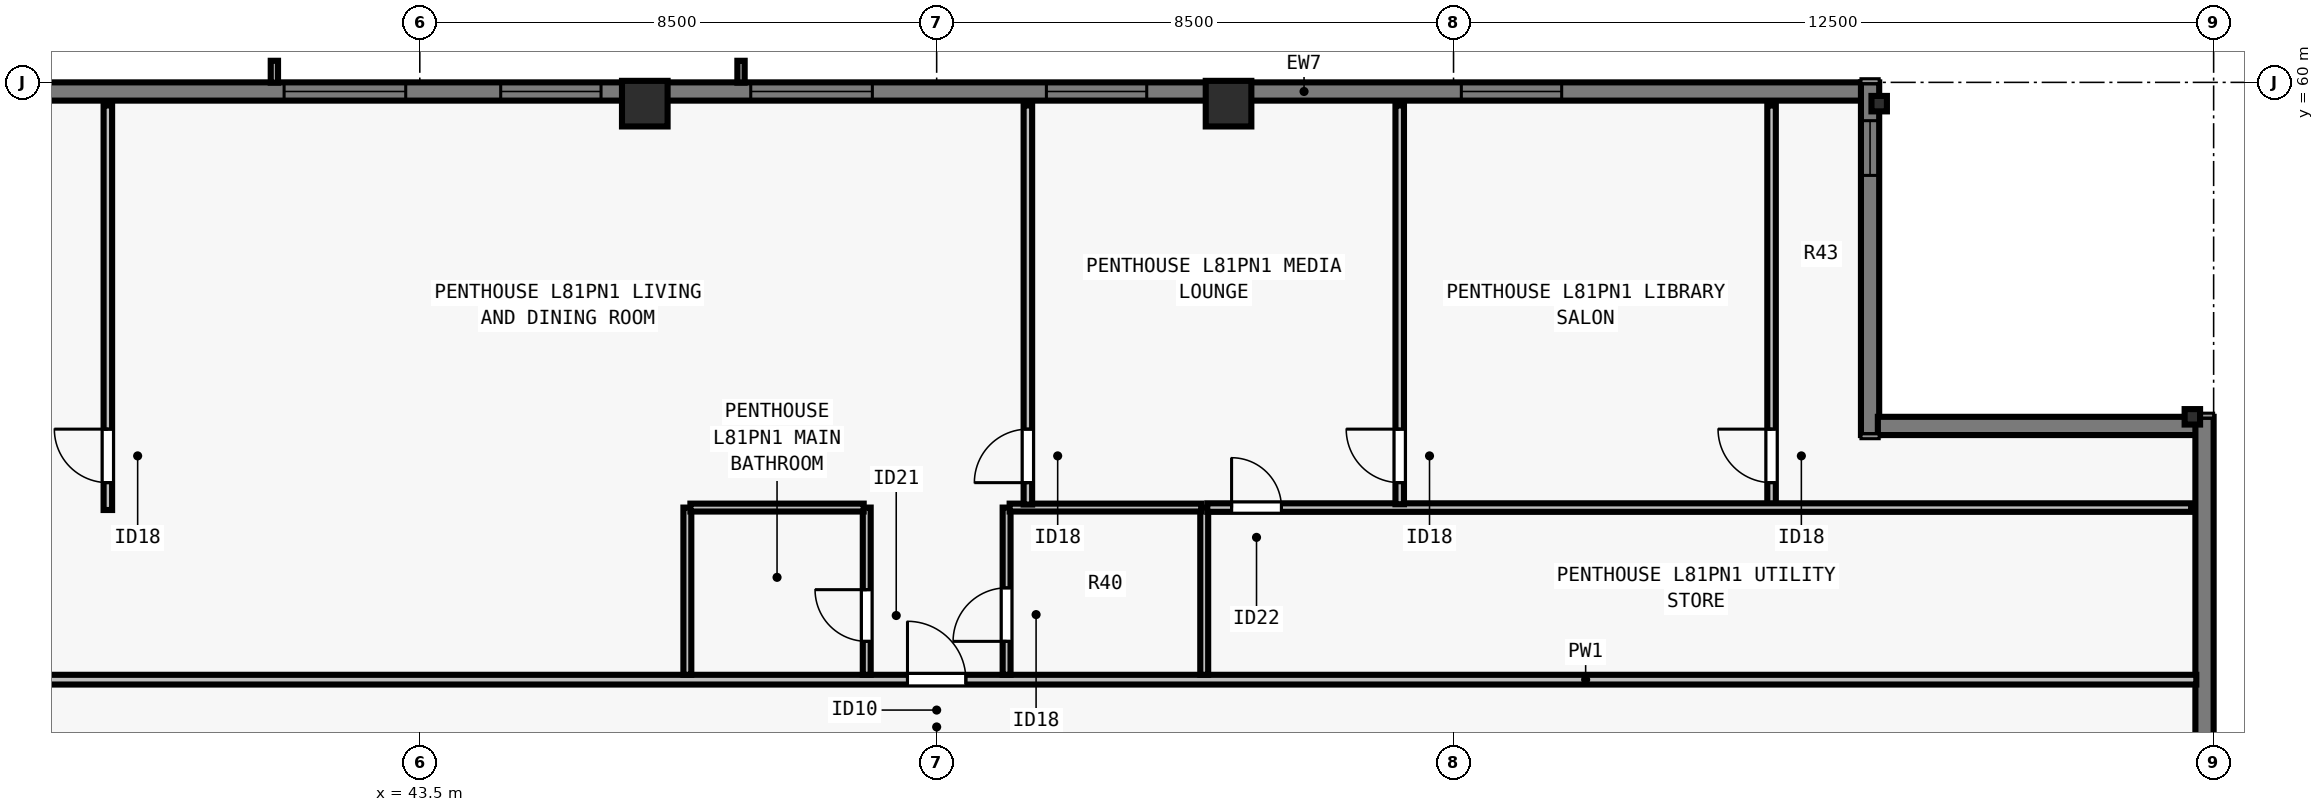
"""IFC4 building model, lengths in metres.
Left out: names, types, materials, properties, quantities, classifications, styles, units other than length and angle.
Written with IfcOpenShell. Run it as: python <this file> out.ifc"""

import sys

from ifc_helpers import new_model, si_unit, direction, frame, frame_2d, origin, origin_2d, place, context, subcontext, project, spatial, rectangle, i_section, extrude, element, fill, save


model = new_model("IFC4")
c1 = context("Model", 3, precision=1e-05, world=origin(), true_north=direction((0.0, 1.0)))
c2 = subcontext(c1, "Body", "Model", "MODEL_VIEW")
j1 = project(units=[si_unit("LENGTHUNIT", "METRE"), si_unit("PLANEANGLEUNIT", "RADIAN")], contexts=[c1])
p1 = place(None, origin())
s1 = spatial("IfcSite", under=j1, at=p1, CompositionType="ELEMENT")
p2 = place(p1, origin())
s2 = spatial("IfcBuilding", under=s1, at=p2, CompositionType="ELEMENT")
p3 = place(p2, frame((0.0, 0.0, 294.5)))
s3 = spatial("IfcBuildingStorey", under=s2, at=p3, CompositionType="ELEMENT", Elevation=294.5)
for number, where, z_axis, x_axis in (
    (1, (72.65, 54.5, 0.0), (0.0, 0.0, 1.0), (0.0, 1.0, 0.0)),
    (2, (67.5, 59.65, 0.0), (0.0, 0.0, 1.0), (1.0, 0.0, 0.0)),
):
    element("IfcColumn", number, at=place(p3, frame(where, z_axis=z_axis, x_axis=x_axis)), inside=s3, PredefinedType="COLUMN", context=c2, shape_type="SweptSolid", body=[
        extrude(i_section(OverallWidth=0.254, OverallDepth=0.254, WebThickness=0.009, FlangeThickness=0.014, FilletRadius=0.013, at=origin_2d()), origin(), (0.0, 0.0, 1.0), 3.5),
    ])
for number, where, z_axis, x_axis in (
    (3, (56.8, 59.65, 0.0), (0.0, 0.0, 1.0), (1.0, 0.0, 0.0)),
    (4, (47.2, 59.65, 0.0), (0.0, 0.0, 1.0), (1.0, 0.0, 0.0)),
):
    element("IfcColumn", number, at=place(p3, frame(where, z_axis=z_axis, x_axis=x_axis)), inside=s3, PredefinedType="COLUMN", context=c2, shape_type="SweptSolid", body=[
        extrude(rectangle(XDim=0.75, YDim=0.75, at=origin_2d()), origin(), (0.0, 0.0, 1.0), 3.5),
    ])
p4 = place(p3, frame((36.5, 59.85, 0.0), z_axis=(0.0, 0.0, 1.0), x_axis=(1.0, 0.0, 0.0)))
e5 = element("IfcWall", 5, at=p4, inside=s3, PredefinedType="SOLIDWALL", context=c2, shape_type="SweptSolid", body=[
    extrude(rectangle(XDim=30.722, YDim=0.3, at=frame_2d((15.361, 0.0))), origin(), (0.0, 0.0, 1.0), 3.29),
])
p5 = place(p4, frame((4.769, 0.0, 0.8)))
e6 = element("IfcOpeningElement", 6, at=p5, cuts=e5, PredefinedType="OPENING", context=c2, shape_type="SweptSolid", body=[
    extrude(rectangle(XDim=2.0, YDim=1.758, at=frame_2d((1.0, 0.879))), frame((0.0, 0.16, 0.0), z_axis=(0.0, -1.0, 0.0), x_axis=(1.0, 0.0, 0.0)), (0.0, 0.0, 1.0), 0.32),
])
p6 = place(p4, frame((8.331, 0.0, 0.8)))
e7 = element("IfcOpeningElement", 7, at=p6, cuts=e5, PredefinedType="OPENING", context=c2, shape_type="SweptSolid", body=[
    extrude(rectangle(XDim=1.65, YDim=1.758, at=frame_2d((0.825, 0.879))), frame((0.0, 0.16, 0.0), z_axis=(0.0, -1.0, 0.0), x_axis=(1.0, 0.0, 0.0)), (0.0, 0.0, 1.0), 0.32),
])
p7 = place(p4, frame((12.442, 0.0, 0.8)))
e8 = element("IfcOpeningElement", 8, at=p7, cuts=e5, PredefinedType="OPENING", context=c2, shape_type="SweptSolid", body=[
    extrude(rectangle(XDim=2.0, YDim=1.758, at=frame_2d((1.0, 0.879))), frame((0.0, 0.16, 0.0), z_axis=(0.0, -1.0, 0.0), x_axis=(1.0, 0.0, 0.0)), (0.0, 0.0, 1.0), 0.32),
])
p8 = place(p4, frame((17.304, 0.0, 0.8)))
e9 = element("IfcOpeningElement", 9, at=p8, cuts=e5, PredefinedType="OPENING", context=c2, shape_type="SweptSolid", body=[
    extrude(rectangle(XDim=1.65, YDim=1.758, at=frame_2d((0.825, 0.879))), frame((0.0, 0.16, 0.0), z_axis=(0.0, -1.0, 0.0), x_axis=(1.0, 0.0, 0.0)), (0.0, 0.0, 1.0), 0.32),
])
p9 = place(p4, frame((24.128, 0.0, 0.8)))
e10 = element("IfcOpeningElement", 10, at=p9, cuts=e5, PredefinedType="OPENING", context=c2, shape_type="SweptSolid", body=[
    extrude(rectangle(XDim=1.65, YDim=1.758, at=frame_2d((0.825, 0.879))), frame((0.0, 0.16, 0.0), z_axis=(0.0, -1.0, 0.0), x_axis=(1.0, 0.0, 0.0)), (0.0, 0.0, 1.0), 0.32),
])
p10 = place(p3, frame((67.35, 60.0, 0.0), z_axis=(0.0, 0.0, 1.0), x_axis=(0.0, -1.0, 0.0)))
e11 = element("IfcWall", 11, at=p10, inside=s3, PredefinedType="SOLIDWALL", context=c2, shape_type="SweptSolid", body=[
    extrude(rectangle(XDim=5.8, YDim=0.3, at=frame_2d((2.9, 0.0))), origin(), (0.0, 0.0, 1.0), 3.29),
])
p11 = place(p10, frame((0.63, 0.0, 0.8)))
e12 = element("IfcOpeningElement", 12, at=p11, cuts=e11, PredefinedType="OPENING", context=c2, shape_type="SweptSolid", body=[
    extrude(rectangle(XDim=0.9, YDim=1.75, at=frame_2d((0.45, 0.875))), frame((0.0, 0.16, 0.0), z_axis=(0.0, -1.0, 0.0), x_axis=(1.0, 0.0, 0.0)), (0.0, 0.0, 1.0), 0.32),
])
p12 = place(p3, frame((67.478, 54.35, 0.0), z_axis=(0.0, 0.0, 1.0), x_axis=(1.0, 0.0, 0.0)))
e13 = element("IfcWall", 13, at=p12, inside=s3, PredefinedType="SOLIDWALL", context=c2, shape_type="SweptSolid", body=[
    extrude(rectangle(XDim=5.244, YDim=0.3, at=frame_2d((2.622, 0.0))), origin(), (0.0, 0.0, 1.0), 3.29),
])
p13 = place(p3, frame((72.85, 54.5, 0.0), z_axis=(0.0, 0.0, 1.0), x_axis=(0.0, -1.0, 0.0)))
e14 = element("IfcWall", 14, at=p13, inside=s3, PredefinedType="SOLIDWALL", context=c2, shape_type="SweptSolid", body=[
    extrude(rectangle(XDim=21.422, YDim=0.3, at=frame_2d((10.711, 0.0))), origin(), (0.0, 0.0, 1.0), 3.29),
])
p14 = place(p13, frame((8.296, 0.0, 0.8)))
e15 = element("IfcOpeningElement", 15, at=p14, cuts=e14, PredefinedType="OPENING", context=c2, shape_type="SweptSolid", body=[
    extrude(rectangle(XDim=1.65, YDim=1.758, at=frame_2d((0.825, 0.879))), frame((0.0, 0.16, 0.0), z_axis=(0.0, -1.0, 0.0), x_axis=(1.0, 0.0, 0.0)), (0.0, 0.0, 1.0), 0.32),
])
p15 = place(p13, frame((13.051, 0.0, 0.8)))
e16 = element("IfcOpeningElement", 16, at=p15, cuts=e14, PredefinedType="OPENING", context=c2, shape_type="SweptSolid", body=[
    extrude(rectangle(XDim=2.0, YDim=1.758, at=frame_2d((1.0, 0.879))), frame((0.0, 0.16, 0.0), z_axis=(0.0, -1.0, 0.0), x_axis=(1.0, 0.0, 0.0)), (0.0, 0.0, 1.0), 0.32),
])
p16 = place(p13, frame((17.307, 0.0, 0.8)))
e17 = element("IfcOpeningElement", 17, at=p16, cuts=e14, PredefinedType="OPENING", context=c2, shape_type="SweptSolid", body=[
    extrude(rectangle(XDim=1.65, YDim=1.758, at=frame_2d((0.825, 0.879))), frame((0.0, 0.16, 0.0), z_axis=(0.0, -1.0, 0.0), x_axis=(1.0, 0.0, 0.0)), (0.0, 0.0, 1.0), 0.32),
])
p17 = place(p3, frame((31.285, 50.177, 0.0), z_axis=(0.0, 0.0, 1.0), x_axis=(1.0, 0.0, 0.0)))
e18 = element("IfcWall", 18, at=p17, inside=s3, PredefinedType="PARTITIONING", context=c2, shape_type="SweptSolid", body=[
    extrude(rectangle(XDim=41.43, YDim=0.16, at=frame_2d((20.715, 0.0))), origin(), (0.0, 0.0, 1.0), 3.009),
])
p18 = place(p17, frame((20.235, 0.0, 0.0)))
e19 = element("IfcOpeningElement", 19, at=p18, cuts=e18, PredefinedType="OPENING", context=c2, shape_type="SweptSolid", body=[
    extrude(rectangle(XDim=0.96, YDim=2.18, at=frame_2d((0.48, 1.09))), frame((0.0, 0.09, 0.0), z_axis=(0.0, -1.0, 0.0), x_axis=(1.0, 0.0, 0.0)), (0.0, 0.0, 1.0), 0.18),
])
p19 = place(p3, frame((47.9, 50.258, 0.0), z_axis=(0.0, 0.0, 1.0), x_axis=(0.0, 1.0, 0.0)))
e20 = element("IfcWall", 20, at=p19, inside=s3, PredefinedType="PLUMBINGWALL", context=c2, shape_type="SweptSolid", body=[
    extrude(rectangle(XDim=2.75, YDim=0.13, at=frame_2d((1.375, 0.0))), origin(), (0.0, 0.0, 1.0), 3.29),
])
p20 = place(p3, frame((50.85, 50.258, 0.0), z_axis=(0.0, 0.0, 1.0), x_axis=(0.0, 1.0, 0.0)))
e21 = element("IfcWall", 21, at=p20, inside=s3, PredefinedType="PLUMBINGWALL", context=c2, shape_type="SweptSolid", body=[
    extrude(rectangle(XDim=2.75, YDim=0.13, at=frame_2d((1.375, 0.0))), origin(), (0.0, 0.0, 1.0), 3.009),
])
p21 = place(p20, frame((0.55, 0.0, 0.0)))
e22 = element("IfcOpeningElement", 22, at=p21, cuts=e21, PredefinedType="OPENING", context=c2, shape_type="SweptSolid", body=[
    extrude(rectangle(XDim=0.85, YDim=2.08, at=frame_2d((0.425, 1.04))), frame((0.0, 0.075, 0.0), z_axis=(0.0, -1.0, 0.0), x_axis=(1.0, 0.0, 0.0)), (0.0, 0.0, 1.0), 0.15),
])
p22 = place(p3, frame((47.95, 53.008, 0.0), z_axis=(0.0, 0.0, 1.0), x_axis=(1.0, 0.0, 0.0)))
e23 = element("IfcWall", 23, at=p22, inside=s3, PredefinedType="PLUMBINGWALL", context=c2, shape_type="SweptSolid", body=[
    extrude(rectangle(XDim=2.85, YDim=0.13, at=frame_2d((1.425, 0.0))), origin(), (0.0, 0.0, 1.0), 3.29),
])
p23 = place(p3, frame((56.4, 50.258, 0.0), z_axis=(0.0, 0.0, 1.0), x_axis=(0.0, 1.0, 0.0)))
e24 = element("IfcWall", 24, at=p23, inside=s3, PredefinedType="PLUMBINGWALL", context=c2, shape_type="SweptSolid", body=[
    extrude(rectangle(XDim=2.75, YDim=0.13, at=frame_2d((1.375, 0.0))), origin(), (0.0, 0.0, 1.0), 3.29),
])
p24 = place(p3, frame((53.15, 50.258, 0.0), z_axis=(0.0, 0.0, 1.0), x_axis=(0.0, 1.0, 0.0)))
e25 = element("IfcWall", 25, at=p24, inside=s3, PredefinedType="PLUMBINGWALL", context=c2, shape_type="SweptSolid", body=[
    extrude(rectangle(XDim=2.75, YDim=0.13, at=frame_2d((1.375, 0.0))), origin(), (0.0, 0.0, 1.0), 3.29),
])
p25 = place(p24, frame((0.55, 0.0, 0.0)))
e26 = element("IfcOpeningElement", 26, at=p25, cuts=e25, PredefinedType="OPENING", context=c2, shape_type="SweptSolid", body=[
    extrude(rectangle(XDim=0.88, YDim=2.1, at=frame_2d((0.44, 1.05))), frame((0.0, 0.075, 0.0), z_axis=(0.0, -1.0, 0.0), x_axis=(1.0, 0.0, 0.0)), (0.0, 0.0, 1.0), 0.15),
])
p26 = place(p3, frame((53.2, 53.008, 0.0), z_axis=(0.0, 0.0, 1.0), x_axis=(1.0, 0.0, 0.0)))
e27 = element("IfcWall", 27, at=p26, inside=s3, PredefinedType="PLUMBINGWALL", context=c2, shape_type="SweptSolid", body=[
    extrude(rectangle(XDim=3.15, YDim=0.13, at=frame_2d((1.575, 0.0))), origin(), (0.0, 0.0, 1.0), 3.29),
])
p27 = place(p3, frame((38.37, 52.968, 0.0), z_axis=(0.0, 0.0, 1.0), x_axis=(0.0, 1.0, 0.0)))
e28 = element("IfcWall", 28, at=p27, inside=s3, PredefinedType="PARTITIONING", context=c2, shape_type="SweptSolid", body=[
    extrude(rectangle(XDim=6.653, YDim=0.14, at=frame_2d((3.326, 0.0))), origin(), (0.0, 0.0, 1.0), 2.653),
])
p28 = place(p27, frame((0.45, 0.0, 0.0)))
e29 = element("IfcOpeningElement", 29, at=p28, cuts=e28, PredefinedType="OPENING", context=c2, shape_type="SweptSolid", body=[
    extrude(rectangle(XDim=0.88, YDim=2.1, at=frame_2d((0.44, 1.05))), frame((0.0, 0.08, 0.0), z_axis=(0.0, -1.0, 0.0), x_axis=(1.0, 0.0, 0.0)), (0.0, 0.0, 1.0), 0.16),
])
p29 = place(p3, frame((65.73, 52.968, 0.0), z_axis=(0.0, 0.0, 1.0), x_axis=(0.0, 1.0, 0.0)))
e30 = element("IfcWall", 30, at=p29, inside=s3, PredefinedType="PARTITIONING", context=c2, shape_type="SweptSolid", body=[
    extrude(rectangle(XDim=6.653, YDim=0.14, at=frame_2d((3.326, 0.0))), origin(), (0.0, 0.0, 1.0), 2.653),
])
p30 = place(p29, frame((0.45, 0.0, 0.0)))
e31 = element("IfcOpeningElement", 31, at=p30, cuts=e30, PredefinedType="OPENING", context=c2, shape_type="SweptSolid", body=[
    extrude(rectangle(XDim=0.88, YDim=2.1, at=frame_2d((0.44, 1.05))), frame((0.0, 0.08, 0.0), z_axis=(0.0, -1.0, 0.0), x_axis=(1.0, 0.0, 0.0)), (0.0, 0.0, 1.0), 0.16),
])
p31 = place(p3, frame((56.45, 53.008, 0.0), z_axis=(0.0, 0.0, 1.0), x_axis=(1.0, 0.0, 0.0)))
e32 = element("IfcWall", 32, at=p31, inside=s3, PredefinedType="PARTITIONING", context=c2, shape_type="SweptSolid", body=[
    extrude(rectangle(XDim=16.18, YDim=0.14, at=frame_2d((8.09, 0.0))), origin(), (0.0, 0.0, 1.0), 3.009),
])
p32 = place(p31, frame((0.4, 0.0, 0.0)))
e33 = element("IfcOpeningElement", 33, at=p32, cuts=e32, PredefinedType="OPENING", context=c2, shape_type="SweptSolid", body=[
    extrude(rectangle(XDim=0.82, YDim=2.1, at=frame_2d((0.41, 1.05))), frame((0.0, 0.08, 0.0), z_axis=(0.0, -1.0, 0.0), x_axis=(1.0, 0.0, 0.0)), (0.0, 0.0, 1.0), 0.16),
])
p33 = place(p3, frame((53.5, 53.058, 0.0), z_axis=(0.0, 0.0, 1.0), x_axis=(0.0, 1.0, 0.0)))
e34 = element("IfcWall", 34, at=p33, inside=s3, PredefinedType="PARTITIONING", context=c2, shape_type="SweptSolid", body=[
    extrude(rectangle(XDim=6.562, YDim=0.14, at=frame_2d((3.281, 0.0))), origin(), (0.0, 0.0, 1.0), 3.009),
])
p34 = place(p33, frame((0.36, 0.0, 0.0)))
e35 = element("IfcOpeningElement", 35, at=p34, cuts=e34, PredefinedType="OPENING", context=c2, shape_type="SweptSolid", body=[
    extrude(rectangle(XDim=0.88, YDim=2.1, at=frame_2d((0.44, 1.05))), frame((0.0, 0.08, 0.0), z_axis=(0.0, -1.0, 0.0), x_axis=(1.0, 0.0, 0.0)), (0.0, 0.0, 1.0), 0.16),
])
p35 = place(p3, frame((59.615, 53.062, 0.0), z_axis=(0.0, 0.0, 1.0), x_axis=(0.0, 1.0, 0.0)))
e36 = element("IfcWall", 36, at=p35, inside=s3, PredefinedType="PARTITIONING", context=c2, shape_type="SweptSolid", body=[
    extrude(rectangle(XDim=6.558, YDim=0.14, at=frame_2d((3.279, 0.0))), origin(), (0.0, 0.0, 1.0), 3.29),
])
p36 = place(p35, frame((0.355, 0.0, 0.0)))
e37 = element("IfcOpeningElement", 37, at=p36, cuts=e36, PredefinedType="OPENING", context=c2, shape_type="SweptSolid", body=[
    extrude(rectangle(XDim=0.88, YDim=2.1, at=frame_2d((0.44, 1.05))), frame((0.0, 0.08, 0.0), z_axis=(0.0, -1.0, 0.0), x_axis=(1.0, 0.0, 0.0)), (0.0, 0.0, 1.0), 0.16),
])
p37 = place(p5, origin())
e38 = element("IfcWindow", 38, at=p37, inside=s3, PartitioningType="SINGLE_PANEL", PredefinedType="WINDOW", context=c2, shape_type="SweptSolid", body=[
    extrude(rectangle(XDim=2.0, YDim=1.758, at=frame_2d((1.0, 0.879))), frame((0.0, -0.05, 0.0), z_axis=(0.0, -1.0, 0.0), x_axis=(1.0, 0.0, 0.0)), (0.0, 0.0, 1.0), 0.06),
])
fill(e6, e38)
p38 = place(p6, origin())
e39 = element("IfcWindow", 39, at=p38, inside=s3, PartitioningType="SINGLE_PANEL", PredefinedType="WINDOW", context=c2, shape_type="SweptSolid", body=[
    extrude(rectangle(XDim=1.65, YDim=1.758, at=frame_2d((0.825, 0.879))), frame((0.0, -0.05, 0.0), z_axis=(0.0, -1.0, 0.0), x_axis=(1.0, 0.0, 0.0)), (0.0, 0.0, 1.0), 0.06),
])
fill(e7, e39)
p39 = place(p7, origin())
e40 = element("IfcWindow", 40, at=p39, inside=s3, PartitioningType="SINGLE_PANEL", PredefinedType="WINDOW", context=c2, shape_type="SweptSolid", body=[
    extrude(rectangle(XDim=2.0, YDim=1.758, at=frame_2d((1.0, 0.879))), frame((0.0, -0.05, 0.0), z_axis=(0.0, -1.0, 0.0), x_axis=(1.0, 0.0, 0.0)), (0.0, 0.0, 1.0), 0.06),
])
fill(e8, e40)
p40 = place(p8, origin())
e41 = element("IfcWindow", 41, at=p40, inside=s3, PartitioningType="SINGLE_PANEL", PredefinedType="WINDOW", context=c2, shape_type="SweptSolid", body=[
    extrude(rectangle(XDim=1.65, YDim=1.758, at=frame_2d((0.825, 0.879))), frame((0.0, -0.05, 0.0), z_axis=(0.0, -1.0, 0.0), x_axis=(1.0, 0.0, 0.0)), (0.0, 0.0, 1.0), 0.06),
])
fill(e9, e41)
p41 = place(p9, origin())
e42 = element("IfcWindow", 42, at=p41, inside=s3, PartitioningType="SINGLE_PANEL", PredefinedType="WINDOW", context=c2, shape_type="SweptSolid", body=[
    extrude(rectangle(XDim=1.65, YDim=1.758, at=frame_2d((0.825, 0.879))), frame((0.0, -0.05, 0.0), z_axis=(0.0, -1.0, 0.0), x_axis=(1.0, 0.0, 0.0)), (0.0, 0.0, 1.0), 0.06),
])
fill(e10, e42)
p42 = place(p11, origin())
e43 = element("IfcWindow", 43, at=p42, inside=s3, PartitioningType="SINGLE_PANEL", PredefinedType="WINDOW", context=c2, shape_type="SweptSolid", body=[
    extrude(rectangle(XDim=0.9, YDim=1.75, at=frame_2d((0.45, 0.875))), frame((0.0, -0.04, 0.0), z_axis=(0.0, -1.0, 0.0), x_axis=(1.0, 0.0, 0.0)), (0.0, 0.0, 1.0), 0.06),
])
fill(e12, e43)
p43 = place(p21, origin())
e44 = element("IfcDoor", 44, at=p43, inside=s3, OperationType="SINGLE_SWING_RIGHT", PredefinedType="DOOR", context=c2, shape_type="SweptSolid", body=[
    extrude(rectangle(XDim=0.85, YDim=2.08, at=frame_2d((0.425, 1.04))), frame((0.0, 0.025, 0.0), z_axis=(0.0, -1.0, 0.0), x_axis=(1.0, 0.0, 0.0)), (0.0, 0.0, 1.0), 0.05),
])
fill(e22, e44)
p44 = place(p25, origin())
e45 = element("IfcDoor", 45, at=p44, inside=s3, OperationType="SINGLE_SWING_LEFT", PredefinedType="DOOR", context=c2, shape_type="SweptSolid", body=[
    extrude(rectangle(XDim=0.88, YDim=2.1, at=frame_2d((0.44, 1.05))), frame((0.0, 0.025, 0.0), z_axis=(0.0, -1.0, 0.0), x_axis=(1.0, 0.0, 0.0)), (0.0, 0.0, 1.0), 0.05),
])
fill(e26, e45)
p45 = place(p28, origin())
e46 = element("IfcDoor", 46, at=p45, inside=s3, OperationType="SINGLE_SWING_RIGHT", PredefinedType="DOOR", context=c2, shape_type="SweptSolid", body=[
    extrude(rectangle(XDim=0.88, YDim=2.1, at=frame_2d((0.44, 1.05))), frame((0.0, 0.025, 0.0), z_axis=(0.0, -1.0, 0.0), x_axis=(1.0, 0.0, 0.0)), (0.0, 0.0, 1.0), 0.05),
])
fill(e29, e46)
p46 = place(p32, origin())
e47 = element("IfcDoor", 47, at=p46, inside=s3, OperationType="SINGLE_SWING_LEFT", PredefinedType="DOOR", context=c2, shape_type="SweptSolid", body=[
    extrude(rectangle(XDim=0.82, YDim=2.1, at=frame_2d((0.41, 1.05))), frame((0.0, 0.025, 0.0), z_axis=(0.0, -1.0, 0.0), x_axis=(1.0, 0.0, 0.0)), (0.0, 0.0, 1.0), 0.05),
])
fill(e33, e47)
p47 = place(p30, origin())
e48 = element("IfcDoor", 48, at=p47, inside=s3, OperationType="SINGLE_SWING_RIGHT", PredefinedType="DOOR", context=c2, shape_type="SweptSolid", body=[
    extrude(rectangle(XDim=0.88, YDim=2.1, at=frame_2d((0.44, 1.05))), frame((0.0, 0.025, 0.0), z_axis=(0.0, -1.0, 0.0), x_axis=(1.0, 0.0, 0.0)), (0.0, 0.0, 1.0), 0.05),
])
fill(e31, e48)
p48 = place(p34, origin())
e49 = element("IfcDoor", 49, at=p48, inside=s3, OperationType="SINGLE_SWING_LEFT", PredefinedType="DOOR", context=c2, shape_type="SweptSolid", body=[
    extrude(rectangle(XDim=0.88, YDim=2.1, at=frame_2d((0.44, 1.05))), frame((0.0, 0.025, 0.0), z_axis=(0.0, -1.0, 0.0), x_axis=(1.0, 0.0, 0.0)), (0.0, 0.0, 1.0), 0.05),
])
fill(e35, e49)
p49 = place(p36, origin())
e50 = element("IfcDoor", 50, at=p49, inside=s3, OperationType="SINGLE_SWING_RIGHT", PredefinedType="DOOR", context=c2, shape_type="SweptSolid", body=[
    extrude(rectangle(XDim=0.88, YDim=2.1, at=frame_2d((0.44, 1.05))), frame((0.0, 0.025, 0.0), z_axis=(0.0, -1.0, 0.0), x_axis=(1.0, 0.0, 0.0)), (0.0, 0.0, 1.0), 0.05),
])
fill(e37, e50)
p50 = place(p18, origin())
e51 = element("IfcDoor", 51, at=p50, inside=s3, OperationType="SINGLE_SWING_LEFT", PredefinedType="DOOR", context=c2, shape_type="SweptSolid", body=[
    extrude(rectangle(XDim=0.96, YDim=2.18, at=frame_2d((0.48, 1.09))), frame((0.0, 0.025, 0.0), z_axis=(0.0, -1.0, 0.0), x_axis=(1.0, 0.0, 0.0)), (0.0, 0.0, 1.0), 0.05),
])
fill(e19, e51)
save(model, sys.argv[1])
